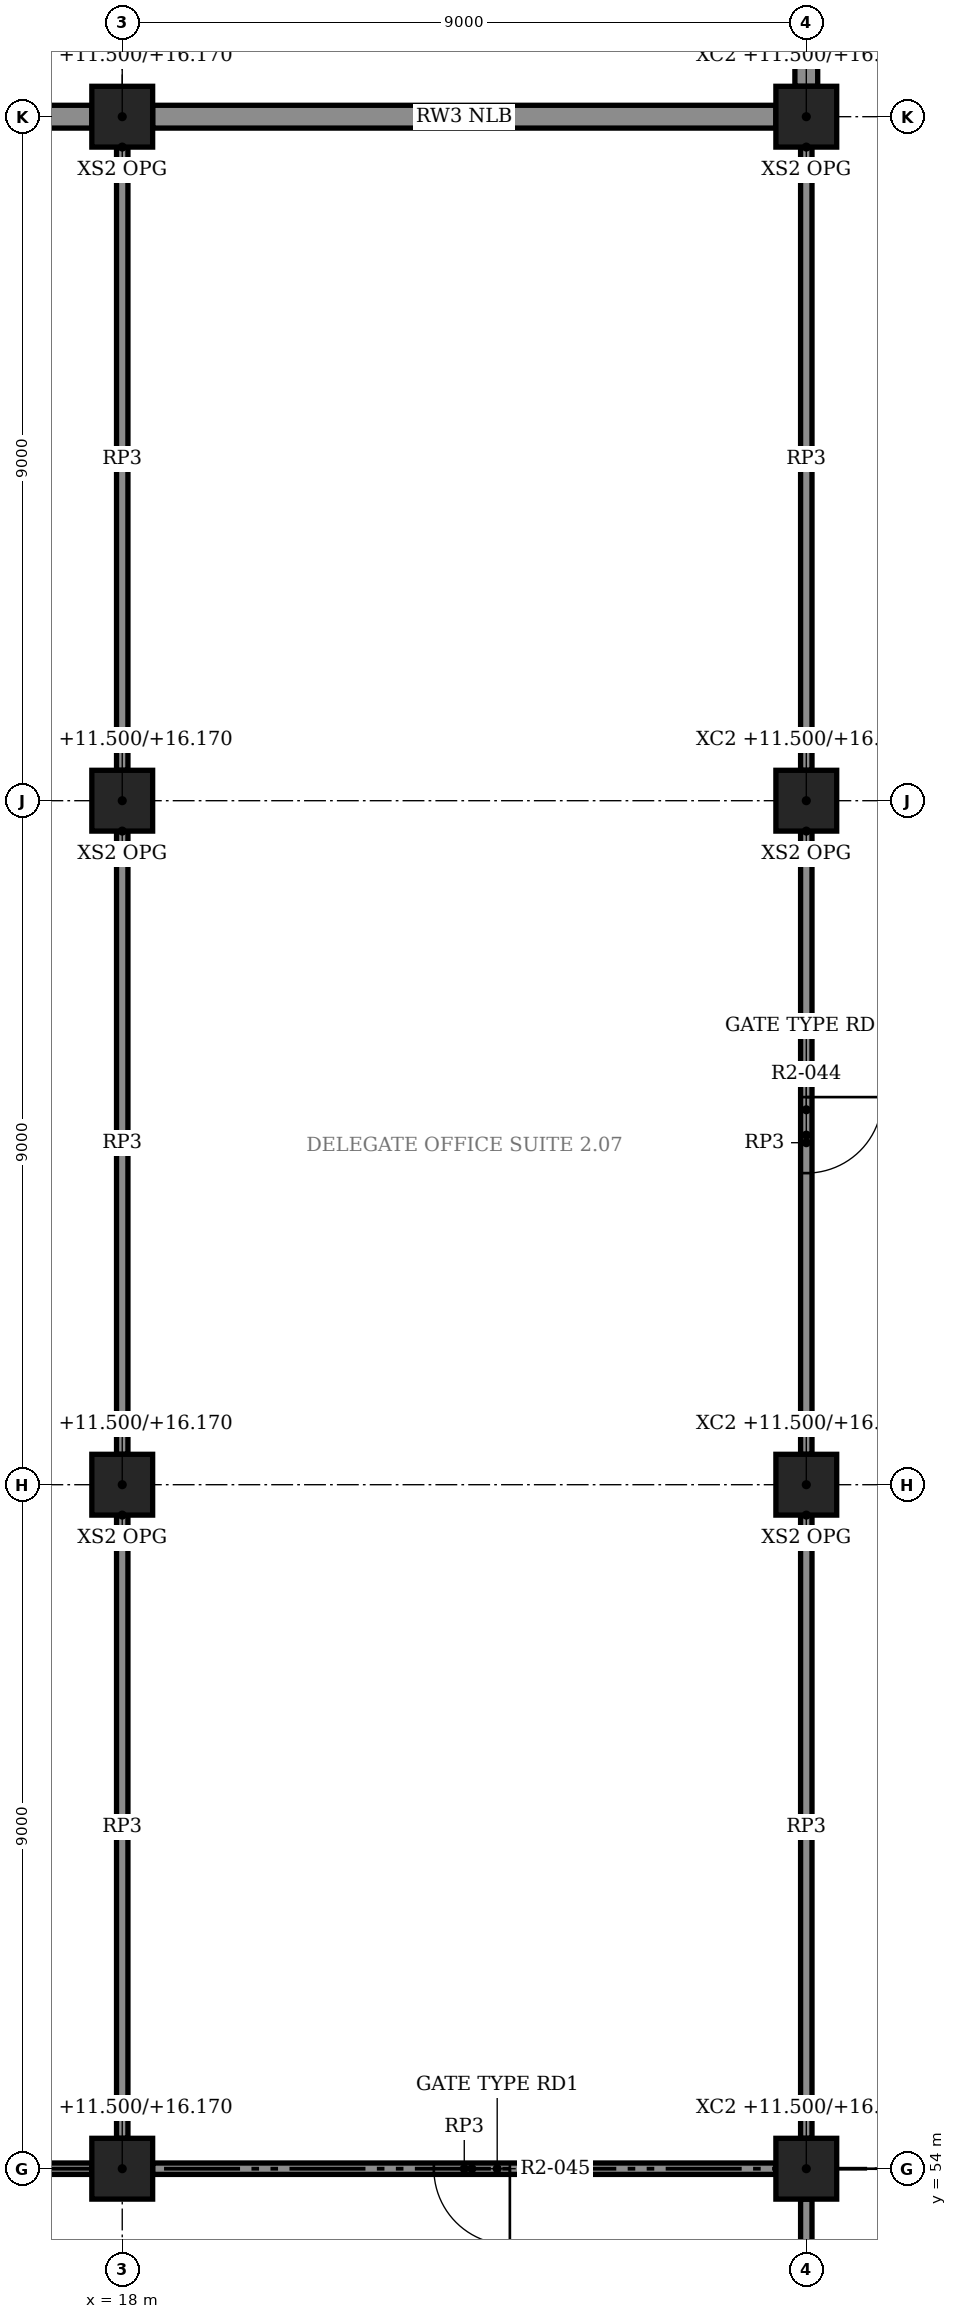
"""IFC4 building model, lengths in metres.
Left out: names, types, materials, properties, quantities, classifications, styles, units other than length and angle.
Written with IfcOpenShell. Run it as: python <this file> out.ifc"""

import sys

from ifc_helpers import new_model, si_unit, direction, frame, frame_2d, origin, origin_2d, place, context, subcontext, project, spatial, rectangle, extrude, element, fill, save


model = new_model("IFC4")
c1 = context("Model", 3, precision=1e-05, world=origin(), true_north=direction((0.0, 1.0)))
c2 = subcontext(c1, "Body", "Model", "MODEL_VIEW")
j1 = project(units=[si_unit("LENGTHUNIT", "METRE"), si_unit("PLANEANGLEUNIT", "RADIAN")], contexts=[c1])
p1 = place(None, origin())
s1 = spatial("IfcSite", under=j1, at=p1, CompositionType="ELEMENT")
p2 = place(p1, origin())
s2 = spatial("IfcBuilding", under=s1, at=p2, CompositionType="ELEMENT")
p3 = place(p2, frame((0.0, 0.0, 11.5)))
s3 = spatial("IfcBuildingStorey", under=s2, at=p3, CompositionType="ELEMENT", Elevation=11.5)
for number, where, z_axis, x_axis in (
    (1, (18.0, 54.0, 0.0), (0.0, 0.0, 1.0), (1.0, 0.0, 0.0)),
    (2, (18.0, 63.0, 0.0), (0.0, 0.0, 1.0), (1.0, 0.0, 0.0)),
    (3, (18.0, 72.0, 0.0), (0.0, 0.0, 1.0), (1.0, 0.0, 0.0)),
    (4, (18.0, 81.0, 0.0), (0.0, 0.0, 1.0), (1.0, 0.0, 0.0)),
    (5, (27.0, 54.0, 0.0), (0.0, 0.0, 1.0), (1.0, 0.0, 0.0)),
    (6, (27.0, 63.0, 0.0), (0.0, 0.0, 1.0), (1.0, 0.0, 0.0)),
    (7, (27.0, 72.0, 0.0), (0.0, 0.0, 1.0), (1.0, 0.0, 0.0)),
    (8, (27.0, 81.0, 0.0), (0.0, 0.0, 1.0), (1.0, 0.0, 0.0)),
):
    element("IfcColumn", number, at=place(p3, frame(where, z_axis=z_axis, x_axis=x_axis)), inside=s3, PredefinedType="COLUMN", context=c2, shape_type="SweptSolid", body=[
        extrude(rectangle(XDim=0.8, YDim=0.8, at=origin_2d()), origin(), (0.0, 0.0, 1.0), 4.67),
    ])
for number, where, z_axis, x_axis in (
    (9, (9.4, 81.0, 0.0), (0.0, 0.0, 1.0), (1.0, 0.0, 0.0)),
    (10, (18.4, 81.0, 0.0), (0.0, 0.0, 1.0), (1.0, 0.0, 0.0)),
):
    element("IfcWall", number, at=place(p3, frame(where, z_axis=z_axis, x_axis=x_axis)), inside=s3, PredefinedType="SOLIDWALL", context=c2, shape_type="SweptSolid", body=[
        extrude(rectangle(XDim=8.2, YDim=0.3, at=frame_2d((4.1, 0.0))), origin(), (0.0, 0.0, 1.0), 4.3),
    ])
p4 = place(p3, frame((27.0, 89.6, 0.0), z_axis=(0.0, 0.0, 1.0), x_axis=(0.0, -1.0, 0.0)))
e11 = element("IfcWall", 11, at=p4, inside=s3, PredefinedType="SOLIDWALL", context=c2, shape_type="SweptSolid", body=[
    extrude(rectangle(XDim=8.2, YDim=0.3, at=frame_2d((4.1, 0.0))), origin(), (0.0, 0.0, 1.0), 4.3),
])
p5 = place(p4, frame((2.65, 0.0, 0.0)))
e12 = element("IfcOpeningElement", 12, at=p5, cuts=e11, PredefinedType="OPENING", context=c2, shape_type="SweptSolid", body=[
    extrude(rectangle(XDim=1.8, YDim=2.4, at=frame_2d((0.9, 1.2))), frame((0.0, 0.16, 0.0), z_axis=(0.0, -1.0, 0.0), x_axis=(1.0, 0.0, 0.0)), (0.0, 0.0, 1.0), 0.32),
])
p6 = place(p3, frame((9.4, 54.0, 0.0), z_axis=(0.0, 0.0, 1.0), x_axis=(1.0, 0.0, 0.0)))
e13 = element("IfcWall", 13, at=p6, inside=s3, PredefinedType="PARTITIONING", context=c2, shape_type="SweptSolid", body=[
    extrude(rectangle(XDim=8.2, YDim=0.15, at=frame_2d((4.1, 0.0))), origin(), (0.0, 0.0, 1.0), 4.55),
])
p7 = place(p6, frame((3.7, 0.0, 0.0)))
e14 = element("IfcOpeningElement", 14, at=p7, cuts=e13, PredefinedType="OPENING", context=c2, shape_type="SweptSolid", body=[
    extrude(rectangle(XDim=1.0, YDim=2.4, at=frame_2d((0.5, 1.2))), frame((0.0, 0.085, 0.0), z_axis=(0.0, -1.0, 0.0), x_axis=(1.0, 0.0, 0.0)), (0.0, 0.0, 1.0), 0.17),
])
p8 = place(p3, frame((18.4, 54.0, 0.0), z_axis=(0.0, 0.0, 1.0), x_axis=(1.0, 0.0, 0.0)))
e15 = element("IfcWall", 15, at=p8, inside=s3, PredefinedType="PARTITIONING", context=c2, shape_type="SweptSolid", body=[
    extrude(rectangle(XDim=8.2, YDim=0.15, at=frame_2d((4.1, 0.0))), origin(), (0.0, 0.0, 1.0), 4.55),
])
p9 = place(p8, frame((3.7, 0.0, 0.0)))
e16 = element("IfcOpeningElement", 16, at=p9, cuts=e15, PredefinedType="OPENING", context=c2, shape_type="SweptSolid", body=[
    extrude(rectangle(XDim=1.0, YDim=2.4, at=frame_2d((0.5, 1.2))), frame((0.0, 0.085, 0.0), z_axis=(0.0, -1.0, 0.0), x_axis=(1.0, 0.0, 0.0)), (0.0, 0.0, 1.0), 0.17),
])
for number, where, z_axis, x_axis in (
    (17, (18.0, 54.4, 0.0), (0.0, 0.0, 1.0), (0.0, 1.0, 0.0)),
    (18, (18.0, 63.4, 0.0), (0.0, 0.0, 1.0), (0.0, 1.0, 0.0)),
    (19, (18.0, 72.4, 0.0), (0.0, 0.0, 1.0), (0.0, 1.0, 0.0)),
    (20, (27.0, 45.4, 0.0), (0.0, 0.0, 1.0), (0.0, 1.0, 0.0)),
    (21, (27.0, 54.4, 0.0), (0.0, 0.0, 1.0), (0.0, 1.0, 0.0)),
):
    element("IfcWall", number, at=place(p3, frame(where, z_axis=z_axis, x_axis=x_axis)), inside=s3, PredefinedType="PARTITIONING", context=c2, shape_type="SweptSolid", body=[
        extrude(rectangle(XDim=8.2, YDim=0.15, at=frame_2d((4.1, 0.0))), origin(), (0.0, 0.0, 1.0), 4.55),
    ])
p10 = place(p3, frame((27.0, 63.4, 0.0), z_axis=(0.0, 0.0, 1.0), x_axis=(0.0, 1.0, 0.0)))
e22 = element("IfcWall", 22, at=p10, inside=s3, PredefinedType="PARTITIONING", context=c2, shape_type="SweptSolid", body=[
    extrude(rectangle(XDim=8.2, YDim=0.15, at=frame_2d((4.1, 0.0))), origin(), (0.0, 0.0, 1.0), 4.55),
])
p11 = place(p10, frame((3.7, 0.0, 0.0)))
e23 = element("IfcOpeningElement", 23, at=p11, cuts=e22, PredefinedType="OPENING", context=c2, shape_type="SweptSolid", body=[
    extrude(rectangle(XDim=1.0, YDim=2.4, at=frame_2d((0.5, 1.2))), frame((0.0, 0.085, 0.0), z_axis=(0.0, -1.0, 0.0), x_axis=(1.0, 0.0, 0.0)), (0.0, 0.0, 1.0), 0.17),
])
p12 = place(p3, frame((27.0, 72.4, 0.0), z_axis=(0.0, 0.0, 1.0), x_axis=(0.0, 1.0, 0.0)))
e24 = element("IfcWall", 24, at=p12, inside=s3, PredefinedType="PARTITIONING", context=c2, shape_type="SweptSolid", body=[
    extrude(rectangle(XDim=8.2, YDim=0.15, at=frame_2d((4.1, 0.0))), origin(), (0.0, 0.0, 1.0), 4.55),
])
p13 = place(p11, frame((1.0, 0.0, 0.0), z_axis=(0.0, 0.0, 1.0), x_axis=(-1.0, 0.0, 0.0)))
e25 = element("IfcDoor", 25, at=p13, inside=s3, OperationType="SINGLE_SWING_LEFT", PredefinedType="DOOR", context=c2, shape_type="SweptSolid", body=[
    extrude(rectangle(XDim=1.0, YDim=2.4, at=frame_2d((0.5, 1.2))), frame((0.0, 0.025, 0.0), z_axis=(0.0, -1.0, 0.0), x_axis=(1.0, 0.0, 0.0)), (0.0, 0.0, 1.0), 0.05),
])
fill(e23, e25)
p14 = place(p9, frame((1.0, 0.0, 0.0), z_axis=(0.0, 0.0, 1.0), x_axis=(-1.0, 0.0, 0.0)))
e26 = element("IfcDoor", 26, at=p14, inside=s3, OperationType="SINGLE_SWING_LEFT", PredefinedType="DOOR", context=c2, shape_type="SweptSolid", body=[
    extrude(rectangle(XDim=1.0, YDim=2.4, at=frame_2d((0.5, 1.2))), frame((0.0, 0.025, 0.0), z_axis=(0.0, -1.0, 0.0), x_axis=(1.0, 0.0, 0.0)), (0.0, 0.0, 1.0), 0.05),
])
fill(e16, e26)
save(model, sys.argv[1])
